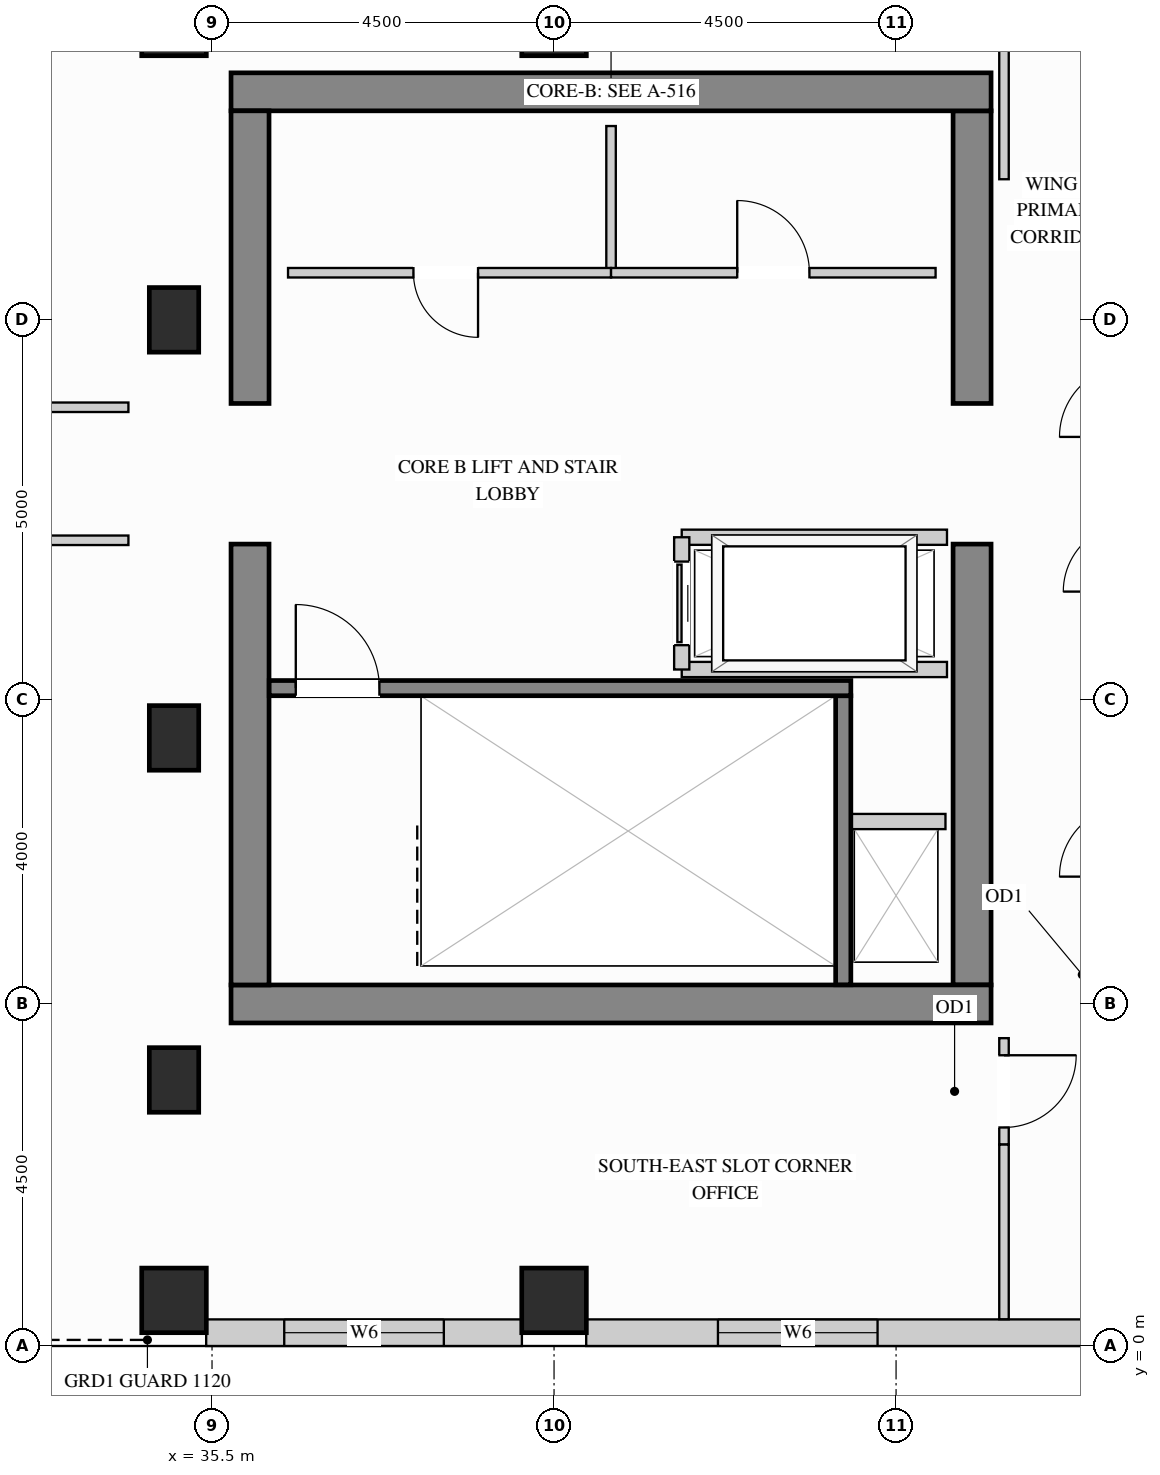
"""IFC4 building model, lengths in metres.
Left out: names, types, materials, properties, quantities, classifications, styles, units other than length and angle.
Written with IfcOpenShell. Run it as: python <this file> out.ifc"""

import sys

from ifc_helpers import new_model, si_unit, direction, frame, frame_2d, origin, origin_2d, place, context, subcontext, project, spatial, rectangle, extrude, source, transform, mapped, element, fill, save


model = new_model("IFC4")
c1 = context("Model", 3, precision=1e-05, world=origin(), true_north=direction((0.0, 1.0)))
c2 = subcontext(c1, "Body", "Model", "MODEL_VIEW")
j1 = project(units=[si_unit("LENGTHUNIT", "METRE"), si_unit("PLANEANGLEUNIT", "RADIAN")], contexts=[c1])
p1 = place(None, origin())
s1 = spatial("IfcSite", under=j1, at=p1, CompositionType="ELEMENT")
p2 = place(p1, origin())
s2 = spatial("IfcBuilding", under=s1, at=p2, CompositionType="ELEMENT")
p3 = place(p2, frame((0.0, 0.0, 259.2)))
s3 = spatial("IfcBuildingStorey", under=s2, at=p3, CompositionType="ELEMENT", Elevation=259.2)
m1 = source(origin(), c2, "Body", "SweptSolid", [
    extrude(rectangle(XDim=0.65, YDim=0.85, at=origin_2d()), origin(), (0.0, 0.0, 1.0), 3.4),
])
for number, where, z_axis, x_axis in (
    (1, (35.0, 13.5, 0.0), (0.0, 0.0, 1.0), (1.0, 0.0, 0.0)),
    (2, (35.0, 3.5, 0.0), (0.0, 0.0, 1.0), (1.0, 0.0, 0.0)),
    (3, (35.0, 8.0, 0.0), (0.0, 0.0, 1.0), (1.0, 0.0, 0.0)),
):
    element("IfcColumn", number, at=place(p3, frame(where, z_axis=z_axis, x_axis=x_axis)), inside=s3, PredefinedType="COLUMN", context=c2, shape_type="MappedRepresentation", body=[
        mapped(m1, transform((0.0, 0.0, 0.0), x_axis=(1.0, 0.0, 0.0), y_axis=(0.0, 1.0, 0.0), z_axis=(0.0, 0.0, 1.0))),
    ])
m2 = source(origin(), c2, "Body", "SweptSolid", [
    extrude(rectangle(XDim=0.85, YDim=0.85, at=origin_2d()), origin(), (0.0, 0.0, 1.0), 3.4),
])
for number, where, z_axis, x_axis in (
    (4, (35.0, 17.4, 0.0), (0.0, 0.0, 1.0), (1.0, 0.0, 0.0)),
    (5, (40.0, 17.4, 0.0), (0.0, 0.0, 1.0), (1.0, 0.0, 0.0)),
    (6, (35.0, 0.6, 0.0), (0.0, 0.0, 1.0), (1.0, 0.0, 0.0)),
    (7, (40.0, 0.6, 0.0), (0.0, 0.0, 1.0), (1.0, 0.0, 0.0)),
):
    element("IfcColumn", number, at=place(p3, frame(where, z_axis=z_axis, x_axis=x_axis)), inside=s3, PredefinedType="COLUMN", context=c2, shape_type="MappedRepresentation", body=[
        mapped(m2, transform((0.0, 0.0, 0.0), x_axis=(1.0, 0.0, 0.0), y_axis=(0.0, 1.0, 0.0), z_axis=(0.0, 0.0, 1.0))),
    ])
m3 = source(origin(), c2, "Body", "SweptSolid", [
    extrude(rectangle(XDim=5.8, YDim=0.5, at=frame_2d((2.9, 0.0))), origin(), (0.0, 0.0, 1.0), 3.4),
])
p4 = place(p3, frame((45.5, 4.75, 0.0), z_axis=(0.0, 0.0, 1.0), x_axis=(0.0, 1.0, 0.0)))
e8 = element("IfcWall", 8, at=p4, inside=s3, PredefinedType="SHEAR", context=c2, shape_type="MappedRepresentation", body=[
    mapped(m3, transform((0.0, 0.0, 0.0), x_axis=(1.0, 0.0, 0.0), y_axis=(0.0, 1.0, 0.0), z_axis=(0.0, 0.0, 1.0))),
])
m4 = source(origin(), c2, "Body", "SweptSolid", [
    extrude(rectangle(XDim=3.85, YDim=0.5, at=frame_2d((1.925, 0.0))), origin(), (0.0, 0.0, 1.0), 3.4),
])
p5 = place(p3, frame((45.5, 12.4, 0.0), z_axis=(0.0, 0.0, 1.0), x_axis=(0.0, 1.0, 0.0)))
e9 = element("IfcWall", 9, at=p5, inside=s3, PredefinedType="SHEAR", context=c2, shape_type="MappedRepresentation", body=[
    mapped(m4, transform((0.0, 0.0, 0.0), x_axis=(1.0, 0.0, 0.0), y_axis=(0.0, 1.0, 0.0), z_axis=(0.0, 0.0, 1.0))),
])
m5 = source(origin(), c2, "Body", "SweptSolid", [
    extrude(rectangle(XDim=10.0, YDim=0.5, at=frame_2d((5.0, 0.0))), origin(), (0.0, 0.0, 1.0), 3.4),
])
for number, where, z_axis, x_axis in (
    (10, (35.75, 16.5, 0.0), (0.0, 0.0, 1.0), (1.0, 0.0, 0.0)),
    (11, (35.75, 4.5, 0.0), (0.0, 0.0, 1.0), (1.0, 0.0, 0.0)),
):
    element("IfcWall", number, at=place(p3, frame(where, z_axis=z_axis, x_axis=x_axis)), inside=s3, PredefinedType="SHEAR", context=c2, shape_type="MappedRepresentation", body=[
        mapped(m5, transform((0.0, 0.0, 0.0), x_axis=(1.0, 0.0, 0.0), y_axis=(0.0, 1.0, 0.0), z_axis=(0.0, 0.0, 1.0))),
    ])
p6 = place(p3, frame((36.0, 4.75, 0.0), z_axis=(0.0, 0.0, 1.0), x_axis=(0.0, 1.0, 0.0)))
e12 = element("IfcWall", 12, at=p6, inside=s3, PredefinedType="SHEAR", context=c2, shape_type="MappedRepresentation", body=[
    mapped(m3, transform((0.0, 0.0, 0.0), x_axis=(1.0, 0.0, 0.0), y_axis=(0.0, 1.0, 0.0), z_axis=(0.0, 0.0, 1.0))),
])
p7 = place(p3, frame((36.0, 12.4, 0.0), z_axis=(0.0, 0.0, 1.0), x_axis=(0.0, 1.0, 0.0)))
e13 = element("IfcWall", 13, at=p7, inside=s3, PredefinedType="SHEAR", context=c2, shape_type="MappedRepresentation", body=[
    mapped(m4, transform((0.0, 0.0, 0.0), x_axis=(1.0, 0.0, 0.0), y_axis=(0.0, 1.0, 0.0), z_axis=(0.0, 0.0, 1.0))),
])
p8 = place(p3, frame((35.423, 0.175, 0.0), z_axis=(0.0, 0.0, 1.0), x_axis=(1.0, 0.0, 0.0)))
e14 = element("IfcWall", 14, at=p8, inside=s3, PredefinedType="SOLIDWALL", context=c2, shape_type="SweptSolid", body=[
    extrude(rectangle(XDim=4.154, YDim=0.35, at=frame_2d((2.077, 0.0))), origin(), (0.0, 0.0, 1.0), 3.385),
])
p9 = place(p8, frame((1.027, 0.0, 0.78)))
e15 = element("IfcOpeningElement", 15, at=p9, cuts=e14, PredefinedType="OPENING", context=c2, shape_type="SweptSolid", body=[
    extrude(rectangle(XDim=2.1, YDim=2.25, at=frame_2d((1.05, 1.125))), frame((0.0, 0.185, 0.0), z_axis=(0.0, -1.0, 0.0), x_axis=(1.0, 0.0, 0.0)), (0.0, 0.0, 1.0), 0.37),
])
p10 = place(p3, frame((40.423, 0.175, 0.0), z_axis=(0.0, 0.0, 1.0), x_axis=(1.0, 0.0, 0.0)))
e16 = element("IfcWall", 16, at=p10, inside=s3, PredefinedType="SOLIDWALL", context=c2, shape_type="SweptSolid", body=[
    extrude(rectangle(XDim=7.077, YDim=0.35, at=frame_2d((3.539, 0.0))), origin(), (0.0, 0.0, 1.0), 3.385),
])
p11 = place(p10, frame((1.733, 0.0, 0.78)))
e17 = element("IfcOpeningElement", 17, at=p11, cuts=e16, PredefinedType="OPENING", context=c2, shape_type="SweptSolid", body=[
    extrude(rectangle(XDim=2.1, YDim=2.25, at=frame_2d((1.05, 1.125))), frame((0.0, 0.185, 0.0), z_axis=(0.0, -1.0, 0.0), x_axis=(1.0, 0.0, 0.0)), (0.0, 0.0, 1.0), 0.37),
])
m6 = source(origin(), c2, "Body", "SweptSolid", [
    extrude(rectangle(XDim=1.93, YDim=0.125, at=frame_2d((0.965, 0.0))), origin(), (0.0, 0.0, 1.0), 3.385),
])
p12 = place(p3, frame((40.75, 14.12, 0.0), z_axis=(0.0, 0.0, 1.0), x_axis=(0.0, 1.0, 0.0)))
e18 = element("IfcWall", 18, at=p12, inside=s3, PredefinedType="PARTITIONING", context=c2, shape_type="MappedRepresentation", body=[
    mapped(m6, transform((0.0, 0.0, 0.0), x_axis=(1.0, 0.0, 0.0), y_axis=(0.0, 1.0, 0.0), z_axis=(0.0, 0.0, 1.0))),
])
p13 = place(p3, frame((36.5, 14.12, 0.0), z_axis=(0.0, 0.0, 1.0), x_axis=(1.0, 0.0, 0.0)))
e19 = element("IfcWall", 19, at=p13, inside=s3, PredefinedType="PARTITIONING", context=c2, shape_type="SweptSolid", body=[
    extrude(rectangle(XDim=4.25, YDim=0.125, at=frame_2d((2.125, 0.0))), origin(), (0.0, 0.0, 1.0), 3.385),
])
p14 = place(p13, frame((1.65, 0.0, 0.0)))
e20 = element("IfcOpeningElement", 20, at=p14, cuts=e19, PredefinedType="OPENING", context=c2, shape_type="SweptSolid", body=[
    extrude(rectangle(XDim=0.85, YDim=2.1, at=frame_2d((0.425, 1.05))), frame((0.0, 0.073, 0.0), z_axis=(0.0, -1.0, 0.0), x_axis=(1.0, 0.0, 0.0)), (0.0, 0.0, 1.0), 0.145),
])
p15 = place(p3, frame((40.75, 14.12, 0.0), z_axis=(0.0, 0.0, 1.0), x_axis=(1.0, 0.0, 0.0)))
e21 = element("IfcWall", 21, at=p15, inside=s3, PredefinedType="PARTITIONING", context=c2, shape_type="SweptSolid", body=[
    extrude(rectangle(XDim=4.27, YDim=0.125, at=frame_2d((2.135, 0.0))), origin(), (0.0, 0.0, 1.0), 3.385),
])
p16 = place(p15, frame((1.66, 0.0, 0.0)))
e22 = element("IfcOpeningElement", 22, at=p16, cuts=e21, PredefinedType="OPENING", context=c2, shape_type="SweptSolid", body=[
    extrude(rectangle(XDim=0.95, YDim=2.15, at=frame_2d((0.475, 1.075))), frame((0.0, 0.073, 0.0), z_axis=(0.0, -1.0, 0.0), x_axis=(1.0, 0.0, 0.0)), (0.0, 0.0, 1.0), 0.145),
])
m7 = source(origin(), c2, "Body", "SweptSolid", [
    extrude(rectangle(XDim=2.298, YDim=0.125, at=frame_2d((1.149, 0.0))), origin(), (0.0, 0.0, 1.0), 3.385),
])
p17 = place(p3, frame((45.92, 15.35, 0.0), z_axis=(0.0, 0.0, 1.0), x_axis=(0.0, 1.0, 0.0)))
e23 = element("IfcWall", 23, at=p17, inside=s3, PredefinedType="PARTITIONING", context=c2, shape_type="MappedRepresentation", body=[
    mapped(m7, transform((0.0, 0.0, 0.0), x_axis=(1.0, 0.0, 0.0), y_axis=(0.0, 1.0, 0.0), z_axis=(0.0, 0.0, 1.0))),
])
p18 = place(p3, frame((45.92, 2.65, 0.0), z_axis=(0.0, 0.0, 1.0), x_axis=(0.0, 1.0, 0.0)))
e24 = element("IfcWall", 24, at=p18, inside=s3, PredefinedType="PARTITIONING", context=c2, shape_type="SweptSolid", body=[
    extrude(rectangle(XDim=1.4, YDim=0.125, at=frame_2d((0.7, 0.0))), origin(), (0.0, 0.0, 1.0), 3.385),
])
p19 = place(p18, frame((0.225, 0.0, 0.0)))
e25 = element("IfcOpeningElement", 25, at=p19, cuts=e24, PredefinedType="OPENING", context=c2, shape_type="SweptSolid", body=[
    extrude(rectangle(XDim=0.95, YDim=2.15, at=frame_2d((0.475, 1.075))), frame((0.0, 0.073, 0.0), z_axis=(0.0, -1.0, 0.0), x_axis=(1.0, 0.0, 0.0)), (0.0, 0.0, 1.0), 0.145),
])
p20 = place(p3, frame((45.92, 0.352, 0.0), z_axis=(0.0, 0.0, 1.0), x_axis=(0.0, 1.0, 0.0)))
e26 = element("IfcWall", 26, at=p20, inside=s3, PredefinedType="PARTITIONING", context=c2, shape_type="MappedRepresentation", body=[
    mapped(m7, transform((0.0, 0.0, 0.0), x_axis=(1.0, 0.0, 0.0), y_axis=(0.0, 1.0, 0.0), z_axis=(0.0, 0.0, 1.0))),
])
p21 = place(p3, frame((29.85, 12.35, 0.0), z_axis=(0.0, 0.0, 1.0), x_axis=(1.0, 0.0, 0.0)))
e27 = element("IfcWall", 27, at=p21, inside=s3, PredefinedType="PARTITIONING", context=c2, shape_type="SweptSolid", body=[
    extrude(rectangle(XDim=4.55, YDim=0.125, at=frame_2d((2.275, 0.0))), origin(), (0.0, 0.0, 1.0), 3.385),
])
p22 = place(p21, frame((1.8, 0.0, 0.0)))
e28 = element("IfcOpeningElement", 28, at=p22, cuts=e27, PredefinedType="OPENING", context=c2, shape_type="SweptSolid", body=[
    extrude(rectangle(XDim=0.95, YDim=2.15, at=frame_2d((0.475, 1.075))), frame((0.0, 0.073, 0.0), z_axis=(0.0, -1.0, 0.0), x_axis=(1.0, 0.0, 0.0)), (0.0, 0.0, 1.0), 0.145),
])
p23 = place(p3, frame((26.95, 10.6, 0.0), z_axis=(0.0, 0.0, 1.0), x_axis=(1.0, 0.0, 0.0)))
e29 = element("IfcWall", 29, at=p23, inside=s3, PredefinedType="PARTITIONING", context=c2, shape_type="SweptSolid", body=[
    extrude(rectangle(XDim=7.45, YDim=0.125, at=frame_2d((3.725, 0.0))), origin(), (0.0, 0.0, 1.0), 3.385),
])
p24 = place(p23, frame((4.478, 0.0, 0.0)))
e30 = element("IfcOpeningElement", 30, at=p24, cuts=e29, PredefinedType="OPENING", context=c2, shape_type="SweptSolid", body=[
    extrude(rectangle(XDim=0.95, YDim=2.15, at=frame_2d((0.475, 1.075))), frame((0.0, 0.073, 0.0), z_axis=(0.0, -1.0, 0.0), x_axis=(1.0, 0.0, 0.0)), (0.0, 0.0, 1.0), 0.145),
])
m8 = source(origin(), c2, "Body", "SweptSolid", [
    extrude(rectangle(XDim=1.3, YDim=0.2, at=frame_2d((0.65, 0.0))), origin(), (0.0, 0.0, 1.0), 3.385),
])
p25 = place(p3, frame((43.85, 6.9, 0.0), z_axis=(0.0, 0.0, 1.0), x_axis=(1.0, 0.0, 0.0)))
e31 = element("IfcWall", 31, at=p25, inside=s3, PredefinedType="PARTITIONING", context=c2, shape_type="MappedRepresentation", body=[
    mapped(m8, transform((0.0, 0.0, 0.0), x_axis=(1.0, 0.0, 0.0), y_axis=(0.0, 1.0, 0.0), z_axis=(0.0, 0.0, 1.0))),
])
m9 = source(origin(), c2, "Body", "SweptSolid", [
    extrude(rectangle(XDim=3.49, YDim=0.2, at=frame_2d((1.745, 0.0))), origin(), (0.0, 0.0, 1.0), 3.385),
])
for number, where, z_axis, x_axis in (
    (32, (41.68, 10.64, 0.0), (0.0, 0.0, 1.0), (1.0, 0.0, 0.0)),
    (33, (41.68, 8.9, 0.0), (0.0, 0.0, 1.0), (1.0, 0.0, 0.0)),
):
    element("IfcWall", number, at=place(p3, frame(where, z_axis=z_axis, x_axis=x_axis)), inside=s3, PredefinedType="PARTITIONING", context=c2, shape_type="MappedRepresentation", body=[
        mapped(m9, transform((0.0, 0.0, 0.0), x_axis=(1.0, 0.0, 0.0), y_axis=(0.0, 1.0, 0.0), z_axis=(0.0, 0.0, 1.0))),
    ])
p26 = place(p3, frame((41.68, 8.9, 0.0), z_axis=(0.0, 0.0, 1.0), x_axis=(0.0, 1.0, 0.0)))
e34 = element("IfcWall", 34, at=p26, inside=s3, PredefinedType="PARTITIONING", context=c2, shape_type="SweptSolid", body=[
    extrude(rectangle(XDim=1.74, YDim=0.2, at=frame_2d((0.87, 0.0))), origin(), (0.0, 0.0, 1.0), 3.385),
])
p27 = place(p26, frame((0.32, 0.0, 0.0)))
e35 = element("IfcOpeningElement", 35, at=p27, cuts=e34, PredefinedType="OPENING", context=c2, shape_type="SweptSolid", body=[
    extrude(rectangle(XDim=1.1, YDim=2.2, at=frame_2d((0.55, 1.1))), frame((0.0, 0.11, 0.0), z_axis=(0.0, -1.0, 0.0), x_axis=(1.0, 0.0, 0.0)), (0.0, 0.0, 1.0), 0.22),
])
m10 = source(origin(), c2, "Body", "SweptSolid", [
    extrude(rectangle(XDim=3.803, YDim=0.2, at=frame_2d((1.901, 0.0))), origin(), (0.0, 0.0, 1.0), 3.4),
])
p28 = place(p3, frame((43.805, 4.752, 0.0), z_axis=(0.0, 0.0, 1.0), x_axis=(0.0, 1.0, 0.0)))
e36 = element("IfcWall", 36, at=p28, inside=s3, PredefinedType="SHEAR", context=c2, shape_type="MappedRepresentation", body=[
    mapped(m10, transform((0.0, 0.0, 0.0), x_axis=(1.0, 0.0, 0.0), y_axis=(0.0, 1.0, 0.0), z_axis=(0.0, 0.0, 1.0))),
])
p29 = place(p3, frame((36.252, 8.655, 0.0), z_axis=(0.0, 0.0, 1.0), x_axis=(1.0, 0.0, 0.0)))
e37 = element("IfcWall", 37, at=p29, inside=s3, PredefinedType="SHEAR", context=c2, shape_type="SweptSolid", body=[
    extrude(rectangle(XDim=7.653, YDim=0.2, at=frame_2d((3.827, 0.0))), origin(), (0.0, 0.0, 1.0), 3.4),
])
p30 = place(p29, frame((0.35, 0.0, 0.0)))
e38 = element("IfcOpeningElement", 38, at=p30, cuts=e37, PredefinedType="OPENING", context=c2, shape_type="SweptSolid", body=[
    extrude(rectangle(XDim=1.1, YDim=2.15, at=frame_2d((0.55, 1.075))), frame((0.0, 0.11, 0.0), z_axis=(0.0, -1.0, 0.0), x_axis=(1.0, 0.0, 0.0)), (0.0, 0.0, 1.0), 0.22),
])
m11 = source(origin(), c2, "Body", "SweptSolid", [
    extrude(rectangle(XDim=1.1, YDim=2.2, at=frame_2d((0.55, 1.1))), frame((0.0, 0.025, 0.0), z_axis=(0.0, -1.0, 0.0), x_axis=(1.0, 0.0, 0.0)), (0.0, 0.0, 1.0), 0.05),
])
p31 = place(p27, origin())
e39 = element("IfcDoor", 39, at=p31, inside=s3, OperationType="SLIDING_TO_LEFT", PredefinedType="DOOR", context=c2, shape_type="MappedRepresentation", body=[
    mapped(m11, transform((0.0, 0.0, 0.0), x_axis=(1.0, 0.0, 0.0), y_axis=(0.0, 1.0, 0.0), z_axis=(0.0, 0.0, 1.0))),
])
fill(e35, e39)
m12 = source(origin(), c2, "Body", "SweptSolid", [
    extrude(rectangle(XDim=0.95, YDim=2.15, at=frame_2d((0.475, 1.075))), frame((0.0, 0.025, 0.0), z_axis=(0.0, -1.0, 0.0), x_axis=(1.0, 0.0, 0.0)), (0.0, 0.0, 1.0), 0.05),
])
p32 = place(p16, origin())
e40 = element("IfcDoor", 40, at=p32, inside=s3, OperationType="SINGLE_SWING_LEFT", PredefinedType="DOOR", context=c2, shape_type="MappedRepresentation", body=[
    mapped(m12, transform((0.0, 0.0, 0.0), x_axis=(1.0, 0.0, 0.0), y_axis=(0.0, 1.0, 0.0), z_axis=(0.0, 0.0, 1.0))),
])
fill(e22, e40)
p33 = place(p19, origin())
e41 = element("IfcDoor", 41, at=p33, inside=s3, OperationType="SINGLE_SWING_RIGHT", PredefinedType="DOOR", context=c2, shape_type="MappedRepresentation", body=[
    mapped(m12, transform((0.0, 0.0, 0.0), x_axis=(1.0, 0.0, 0.0), y_axis=(0.0, 1.0, 0.0), z_axis=(0.0, 0.0, 1.0))),
])
fill(e25, e41)
m13 = source(origin(), c2, "Body", "SweptSolid", [
    extrude(rectangle(XDim=0.85, YDim=2.1, at=frame_2d((0.425, 1.05))), frame((0.0, 0.025, 0.0), z_axis=(0.0, -1.0, 0.0), x_axis=(1.0, 0.0, 0.0)), (0.0, 0.0, 1.0), 0.05),
])
p34 = place(p14, origin())
e42 = element("IfcDoor", 42, at=p34, inside=s3, OperationType="SINGLE_SWING_RIGHT", PredefinedType="DOOR", context=c2, shape_type="MappedRepresentation", body=[
    mapped(m13, transform((0.0, 0.0, 0.0), x_axis=(1.0, 0.0, 0.0), y_axis=(0.0, 1.0, 0.0), z_axis=(0.0, 0.0, 1.0))),
])
fill(e20, e42)
m14 = source(origin(), c2, "Body", "SweptSolid", [
    extrude(rectangle(XDim=1.1, YDim=2.15, at=frame_2d((0.55, 1.075))), frame((0.0, 0.025, 0.0), z_axis=(0.0, -1.0, 0.0), x_axis=(1.0, 0.0, 0.0)), (0.0, 0.0, 1.0), 0.05),
])
p35 = place(p30, origin())
e43 = element("IfcDoor", 43, at=p35, inside=s3, OperationType="SINGLE_SWING_LEFT", PredefinedType="DOOR", context=c2, shape_type="MappedRepresentation", body=[
    mapped(m14, transform((0.0, 0.0, 0.0), x_axis=(1.0, 0.0, 0.0), y_axis=(0.0, 1.0, 0.0), z_axis=(0.0, 0.0, 1.0))),
])
fill(e38, e43)
m15 = source(origin(), c2, "Body", "SweptSolid", [
    extrude(rectangle(XDim=2.1, YDim=2.25, at=frame_2d((1.05, 1.125))), frame((0.0, 0.03, 0.0), z_axis=(0.0, -1.0, 0.0), x_axis=(1.0, 0.0, 0.0)), (0.0, 0.0, 1.0), 0.06),
])
p36 = place(p9, origin())
e44 = element("IfcWindow", 44, at=p36, inside=s3, PartitioningType="SINGLE_PANEL", PredefinedType="WINDOW", context=c2, shape_type="MappedRepresentation", body=[
    mapped(m15, transform((0.0, 0.0, 0.0), x_axis=(1.0, 0.0, 0.0), y_axis=(0.0, 1.0, 0.0), z_axis=(0.0, 0.0, 1.0))),
])
fill(e15, e44)
p37 = place(p11, origin())
e45 = element("IfcWindow", 45, at=p37, inside=s3, PartitioningType="SINGLE_PANEL", PredefinedType="WINDOW", context=c2, shape_type="MappedRepresentation", body=[
    mapped(m15, transform((0.0, 0.0, 0.0), x_axis=(1.0, 0.0, 0.0), y_axis=(0.0, 1.0, 0.0), z_axis=(0.0, 0.0, 1.0))),
])
fill(e17, e45)
save(model, sys.argv[1])
